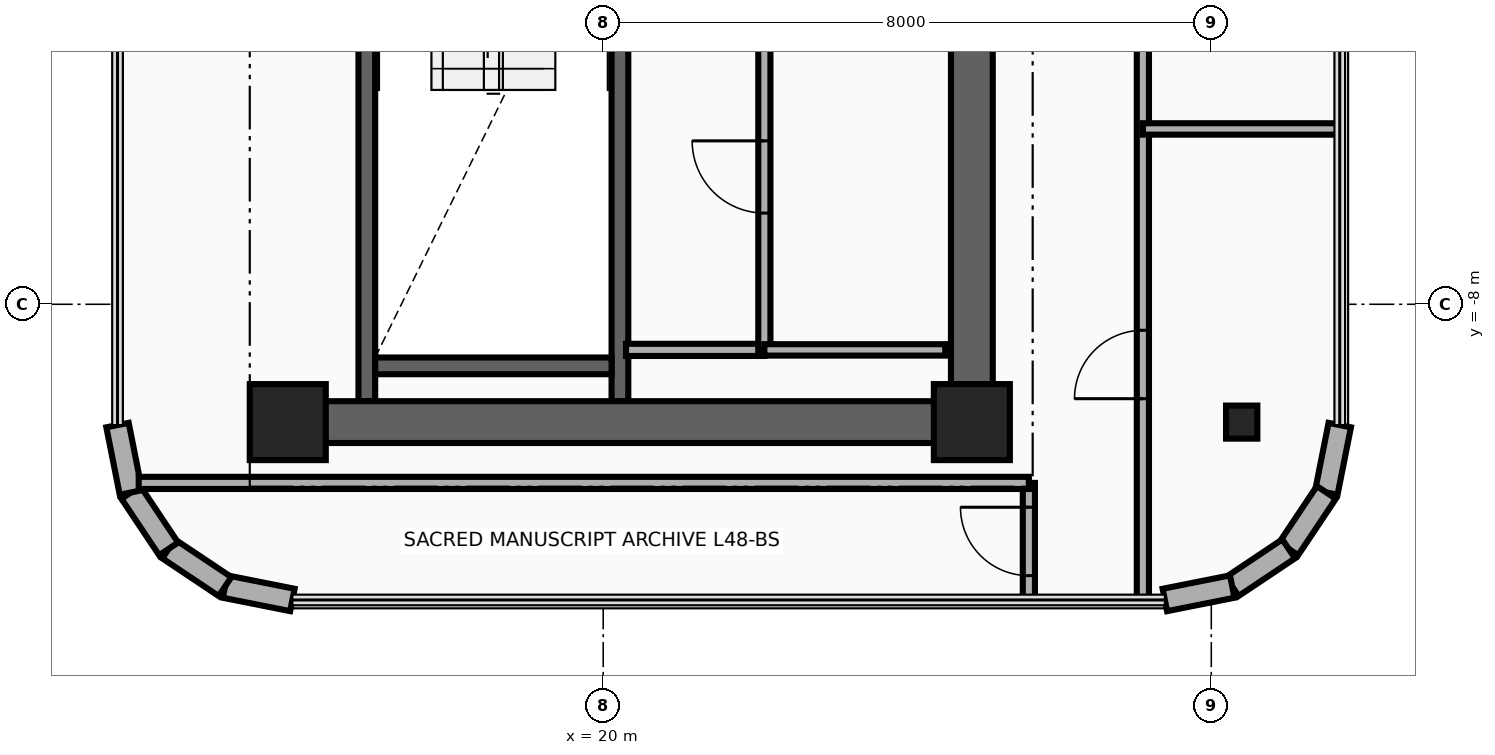
"""IFC4 building model, lengths in metres.
Left out: names, types, materials, properties, quantities, classifications, styles, units other than length and angle.
Written with IfcOpenShell. Run it as: python <this file> out.ifc"""

import sys

from ifc_helpers import new_model, si_unit, direction, frame, frame_2d, origin, origin_2d, place, context, subcontext, project, spatial, rectangle, i_section, extrude, source, transform, mapped, element, fill, save


model = new_model("IFC4")
c1 = context("Model", 3, precision=1e-05, world=origin(), true_north=direction((0.0, 1.0)))
c2 = subcontext(c1, "Body", "Model", "MODEL_VIEW")
j1 = project(units=[si_unit("LENGTHUNIT", "METRE"), si_unit("PLANEANGLEUNIT", "RADIAN")], contexts=[c1])
p1 = place(None, origin())
s1 = spatial("IfcSite", under=j1, at=p1, CompositionType="ELEMENT")
p2 = place(p1, origin())
s2 = spatial("IfcBuilding", under=s1, at=p2, CompositionType="ELEMENT")
p3 = place(p2, frame((0.0, 0.0, 188.4)))
s3 = spatial("IfcBuildingStorey", under=s2, at=p3, CompositionType="ELEMENT", Elevation=188.4)
for number, where, z_axis, x_axis in (
    (1, (16.89, -9.275, 0.0), (0.0, 0.0, 1.0), (0.0, 1.0, 0.0)),
    (2, (20.22, -9.275, 0.0), (0.0, 0.0, 1.0), (0.0, 1.0, 0.0)),
):
    element("IfcWall", number, at=place(p3, frame(where, z_axis=z_axis, x_axis=x_axis)), inside=s3, PredefinedType="SHEAR", context=c2, shape_type="SweptSolid", body=[
        extrude(rectangle(XDim=8.595, YDim=0.22, at=frame_2d((4.297, 0.0))), origin(), (0.0, 0.0, 1.0), 3.63),
    ])
p4 = place(p3, frame((17.0, -8.81, 0.0), z_axis=(0.0, 0.0, 1.0), x_axis=(1.0, 0.0, 0.0)))
e3 = element("IfcWall", 3, at=p4, inside=s3, PredefinedType="SHEAR", context=c2, shape_type="SweptSolid", body=[
    extrude(rectangle(XDim=3.11, YDim=0.22, at=frame_2d((1.555, 0.0))), origin(), (0.0, 0.0, 1.0), 3.63),
])
p5 = place(p3, frame((24.85, -9.825, 0.0), z_axis=(0.0, 0.0, 1.0), x_axis=(0.0, 1.0, 0.0)))
e4 = element("IfcWall", 4, at=p5, inside=s3, PredefinedType="SHEAR", context=c2, shape_type="SweptSolid", body=[
    extrude(rectangle(XDim=8.875, YDim=0.55, at=frame_2d((4.438, 0.0))), origin(), (0.0, 0.0, 1.0), 3.63),
])
p6 = place(p3, frame((15.85, -9.55, 0.0), z_axis=(0.0, 0.0, 1.0), x_axis=(1.0, 0.0, 0.0)))
e5 = element("IfcWall", 5, at=p6, inside=s3, PredefinedType="SHEAR", context=c2, shape_type="SweptSolid", body=[
    extrude(rectangle(XDim=9.0, YDim=0.55, at=frame_2d((4.5, 0.0))), origin(), (0.0, 0.0, 1.0), 3.63),
])
m1 = source(origin(), c2, "Body", "SweptSolid", [
    extrude(rectangle(XDim=1.0, YDim=1.0, at=origin_2d()), origin(), (0.0, 0.0, 1.0), 3.95),
])
for number, where, z_axis, x_axis in (
    (6, (15.85, -9.55, 0.0), (0.0, 0.0, 1.0), (1.0, 0.0, 0.0)),
    (7, (24.85, -9.55, 0.0), (0.0, 0.0, 1.0), (1.0, 0.0, 0.0)),
):
    element("IfcColumn", number, at=place(p3, frame(where, z_axis=z_axis, x_axis=x_axis)), inside=s3, PredefinedType="COLUMN", context=c2, shape_type="MappedRepresentation", body=[
        mapped(m1, transform((0.0, 0.0, 0.0), x_axis=(1.0, 0.0, 0.0), y_axis=(0.0, 1.0, 0.0), z_axis=(0.0, 0.0, 1.0), scale=1.0)),
    ])
m2 = source(origin(), c2, "Body", "SweptSolid", [
    extrude(i_section(OverallWidth=0.412, OverallDepth=0.435, WebThickness=0.036, FlangeThickness=0.057, at=origin_2d()), origin(), (0.0, 0.0, 1.0), 3.95),
])
p7 = place(p3, frame((28.4, -9.55, 0.0), z_axis=(0.0, 0.0, 1.0), x_axis=(1.0, 0.0, 0.0)))
e8 = element("IfcColumn", 8, at=p7, inside=s3, PredefinedType="COLUMN", context=c2, shape_type="MappedRepresentation", body=[
    mapped(m2, transform((0.0, 0.0, 0.0), x_axis=(1.0, 0.0, 0.0), y_axis=(0.0, 1.0, 0.0), z_axis=(0.0, 0.0, 1.0), scale=1.0)),
])
p8 = place(p3, frame((29.69, -9.589, 0.0), z_axis=(0.0, 0.0, 1.0), x_axis=(-0.195025152871, -0.980798241101, 0.0)))
e9 = element("IfcWall", 9, at=p8, inside=s3, PredefinedType="SOLIDWALL", context=c2, shape_type="SweptSolid", body=[
    extrude(rectangle(XDim=0.904, YDim=0.3, at=frame_2d((0.452, 0.0))), origin(), (0.0, 0.0, 1.0), 3.63),
])
p9 = place(p3, frame((29.514, -10.476, 0.0), z_axis=(0.0, 0.0, 1.0), x_axis=(-0.555520488502, -0.831502848374, 0.0)))
e10 = element("IfcWall", 10, at=p9, inside=s3, PredefinedType="SOLIDWALL", context=c2, shape_type="SweptSolid", body=[
    extrude(rectangle(XDim=0.893, YDim=0.3, at=frame_2d((0.446, 0.0))), origin(), (0.0, 0.0, 1.0), 3.63),
])
p10 = place(p3, frame((29.018, -11.218, 0.0), z_axis=(0.0, 0.0, 1.0), x_axis=(-0.83158722889, -0.555394167009, 0.0)))
e11 = element("IfcWall", 11, at=p10, inside=s3, PredefinedType="SOLIDWALL", context=c2, shape_type="SweptSolid", body=[
    extrude(rectangle(XDim=0.893, YDim=0.3, at=frame_2d((0.446, 0.0))), origin(), (0.0, 0.0, 1.0), 3.63),
])
p11 = place(p3, frame((28.275, -11.714, 0.0), z_axis=(0.0, 0.0, 1.0), x_axis=(-0.980787963133, -0.19507683454, 0.0)))
e12 = element("IfcWall", 12, at=p11, inside=s3, PredefinedType="SOLIDWALL", context=c2, shape_type="SweptSolid", body=[
    extrude(rectangle(XDim=0.904, YDim=0.3, at=frame_2d((0.452, 0.0))), origin(), (0.0, 0.0, 1.0), 3.63),
])
p12 = place(p3, frame((15.911, -11.89, 0.0), z_axis=(0.0, 0.0, 1.0), x_axis=(-0.980798241101, 0.195025152871, 0.0)))
e13 = element("IfcWall", 13, at=p12, inside=s3, PredefinedType="SOLIDWALL", context=c2, shape_type="SweptSolid", body=[
    extrude(rectangle(XDim=0.904, YDim=0.3, at=frame_2d((0.452, 0.0))), origin(), (0.0, 0.0, 1.0), 3.63),
])
for number, where, z_axis, x_axis in (
    (14, (15.024, -11.714, 0.0), (0.0, 0.0, 1.0), (-0.832, 0.556, 0.0)),
    (15, (14.282, -11.218, 0.0), (0.0, 0.0, 1.0), (-0.556, 0.832, 0.0)),
):
    element("IfcWall", number, at=place(p3, frame(where, z_axis=z_axis, x_axis=x_axis)), inside=s3, PredefinedType="SOLIDWALL", context=c2, shape_type="SweptSolid", body=[
        extrude(rectangle(XDim=0.893, YDim=0.3, at=frame_2d((0.446, 0.0))), origin(), (0.0, 0.0, 1.0), 3.63),
    ])
p13 = place(p3, frame((13.786, -10.476, 0.0), z_axis=(0.0, 0.0, 1.0), x_axis=(-0.195025152871, 0.980798241101, 0.0)))
e16 = element("IfcWall", 16, at=p13, inside=s3, PredefinedType="SOLIDWALL", context=c2, shape_type="SweptSolid", body=[
    extrude(rectangle(XDim=0.904, YDim=0.3, at=frame_2d((0.452, 0.0))), origin(), (0.0, 0.0, 1.0), 3.63),
])
p14 = place(p3, frame((20.3, -8.6, 0.0), z_axis=(0.0, 0.0, 1.0), x_axis=(1.0, 0.0, 0.0)))
e17 = element("IfcWall", 17, at=p14, inside=s3, PredefinedType="PARTITIONING", context=c2, shape_type="SweptSolid", body=[
    extrude(rectangle(XDim=1.82, YDim=0.16, at=frame_2d((0.91, 0.0))), origin(), (0.0, 0.0, 1.0), 3.63),
])
p15 = place(p3, frame((22.12, -8.6, 0.0), z_axis=(0.0, 0.0, 1.0), x_axis=(0.0, 1.0, 0.0)))
e18 = element("IfcWall", 18, at=p15, inside=s3, PredefinedType="PARTITIONING", context=c2, shape_type="SweptSolid", body=[
    extrude(rectangle(XDim=4.65, YDim=0.16, at=frame_2d((2.325, 0.0))), origin(), (0.0, 0.0, 1.0), 3.63),
])
p16 = place(p15, frame((1.8, 0.0, 0.0)))
e19 = element("IfcOpeningElement", 19, at=p16, cuts=e18, PredefinedType="OPENING", context=c2, shape_type="SweptSolid", body=[
    extrude(rectangle(XDim=0.95, YDim=2.15, at=frame_2d((0.475, 1.075))), frame((0.0, 0.095, 0.0), z_axis=(0.0, -1.0, 0.0), x_axis=(1.0, 0.0, 0.0)), (0.0, 0.0, 1.0), 0.19),
])
p17 = place(p3, frame((22.12, -8.6, 0.0), z_axis=(0.0, 0.0, 1.0), x_axis=(1.0, 0.0, 0.0)))
e20 = element("IfcWall", 20, at=p17, inside=s3, PredefinedType="PARTITIONING", context=c2, shape_type="SweptSolid", body=[
    extrude(rectangle(XDim=2.38, YDim=0.15, at=frame_2d((1.19, 0.0))), origin(), (0.0, 0.0, 1.0), 3.63),
])
p18 = place(p3, frame((25.6, -11.89, 0.0), z_axis=(0.0, 0.0, 1.0), x_axis=(0.0, 1.0, 0.0)))
e21 = element("IfcWall", 21, at=p18, inside=s3, PredefinedType="PARTITIONING", context=c2, shape_type="SweptSolid", body=[
    extrude(rectangle(XDim=1.54, YDim=0.16, at=frame_2d((0.77, 0.0))), origin(), (0.0, 0.0, 1.0), 3.63),
])
p19 = place(p18, frame((0.32, 0.0, 0.0)))
e22 = element("IfcOpeningElement", 22, at=p19, cuts=e21, PredefinedType="OPENING", context=c2, shape_type="SweptSolid", body=[
    extrude(rectangle(XDim=0.9, YDim=2.1, at=frame_2d((0.45, 1.05))), frame((0.0, 0.095, 0.0), z_axis=(0.0, -1.0, 0.0), x_axis=(1.0, 0.0, 0.0)), (0.0, 0.0, 1.0), 0.19),
])
p20 = place(p3, frame((13.889, -10.35, 0.0), z_axis=(0.0, 0.0, 1.0), x_axis=(1.0, 0.0, 0.0)))
e23 = element("IfcWall", 23, at=p20, inside=s3, PredefinedType="PARTITIONING", context=c2, shape_type="SweptSolid", body=[
    extrude(rectangle(XDim=11.711, YDim=0.16, at=frame_2d((5.855, 0.0))), origin(), (0.0, 0.0, 1.0), 3.63),
])
p21 = place(p3, frame((27.1, -11.89, 0.0), z_axis=(0.0, 0.0, 1.0), x_axis=(0.0, 1.0, 0.0)))
e24 = element("IfcWall", 24, at=p21, inside=s3, PredefinedType="PARTITIONING", context=c2, shape_type="SweptSolid", body=[
    extrude(rectangle(XDim=24.81, YDim=0.16, at=frame_2d((12.405, 0.0))), origin(), (0.0, 0.0, 1.0), 2.665),
])
p22 = place(p21, frame((2.648, 0.0, 0.0)))
e25 = element("IfcOpeningElement", 25, at=p22, cuts=e24, PredefinedType="OPENING", context=c2, shape_type="SweptSolid", body=[
    extrude(rectangle(XDim=0.9, YDim=2.1, at=frame_2d((0.45, 1.05))), frame((0.0, 0.095, 0.0), z_axis=(0.0, -1.0, 0.0), x_axis=(1.0, 0.0, 0.0)), (0.0, 0.0, 1.0), 0.19),
])
p23 = place(p21, frame((10.4, 0.0, 0.0)))
e26 = element("IfcOpeningElement", 26, at=p23, cuts=e24, PredefinedType="OPENING", context=c2, shape_type="SweptSolid", body=[
    extrude(rectangle(XDim=0.9, YDim=2.1, at=frame_2d((0.45, 1.05))), frame((0.0, 0.095, 0.0), z_axis=(0.0, -1.0, 0.0), x_axis=(1.0, 0.0, 0.0)), (0.0, 0.0, 1.0), 0.19),
])
p24 = place(p21, frame((19.707, 0.0, 0.0)))
e27 = element("IfcOpeningElement", 27, at=p24, cuts=e24, PredefinedType="OPENING", context=c2, shape_type="SweptSolid", body=[
    extrude(rectangle(XDim=0.9, YDim=2.1, at=frame_2d((0.45, 1.05))), frame((0.0, 0.095, 0.0), z_axis=(0.0, -1.0, 0.0), x_axis=(1.0, 0.0, 0.0)), (0.0, 0.0, 1.0), 0.19),
])
p25 = place(p3, frame((27.1, -5.693, 0.0), z_axis=(0.0, 0.0, 1.0), x_axis=(1.0, 0.0, 0.0)))
e28 = element("IfcWall", 28, at=p25, inside=s3, PredefinedType="PARTITIONING", context=c2, shape_type="SweptSolid", body=[
    extrude(rectangle(XDim=2.59, YDim=0.15, at=frame_2d((1.295, 0.0))), origin(), (0.0, 0.0, 1.0), 3.076),
])
p26 = place(p16, origin())
e29 = element("IfcDoor", 29, at=p26, inside=s3, OperationType="SINGLE_SWING_LEFT", PredefinedType="DOOR", context=c2, shape_type="SweptSolid", body=[
    extrude(rectangle(XDim=0.95, YDim=2.15, at=frame_2d((0.475, 1.075))), frame((0.0, 0.025, 0.0), z_axis=(0.0, -1.0, 0.0), x_axis=(1.0, 0.0, 0.0)), (0.0, 0.0, 1.0), 0.05),
])
fill(e19, e29)
p27 = place(p19, origin())
e30 = element("IfcDoor", 30, at=p27, inside=s3, OperationType="SINGLE_SWING_RIGHT", PredefinedType="DOOR", context=c2, shape_type="SweptSolid", body=[
    extrude(rectangle(XDim=0.9, YDim=2.1, at=frame_2d((0.45, 1.05))), frame((0.0, 0.025, 0.0), z_axis=(0.0, -1.0, 0.0), x_axis=(1.0, 0.0, 0.0)), (0.0, 0.0, 1.0), 0.05),
])
fill(e22, e30)
p28 = place(p22, origin())
e31 = element("IfcDoor", 31, at=p28, inside=s3, OperationType="SINGLE_SWING_RIGHT", PredefinedType="DOOR", context=c2, shape_type="SweptSolid", body=[
    extrude(rectangle(XDim=0.9, YDim=2.1, at=frame_2d((0.45, 1.05))), frame((0.0, 0.025, 0.0), z_axis=(0.0, -1.0, 0.0), x_axis=(1.0, 0.0, 0.0)), (0.0, 0.0, 1.0), 0.05),
])
fill(e25, e31)
save(model, sys.argv[1])
